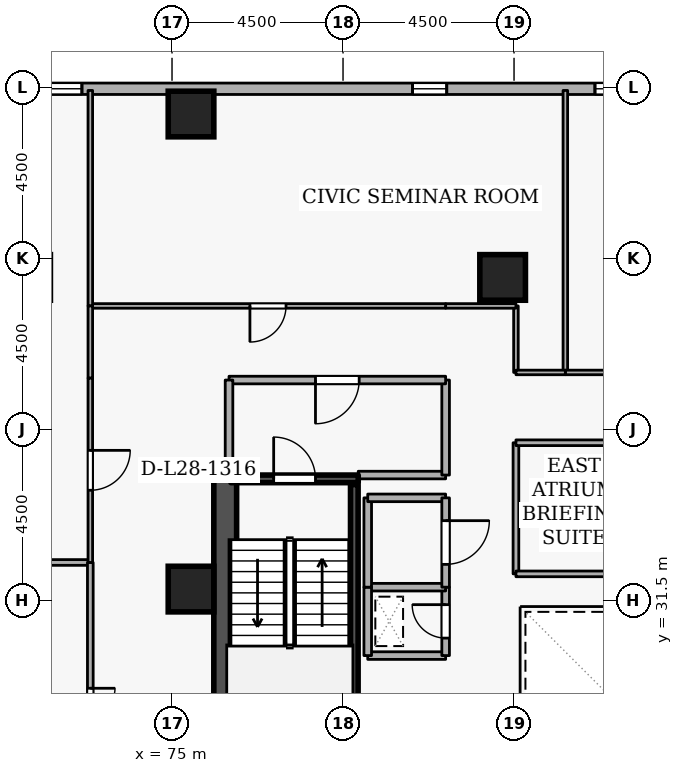
"""IFC4 building model, lengths in metres.
Left out: names, types, materials, properties, quantities, classifications, styles, units other than length and angle.
Written with IfcOpenShell. Run it as: python <this file> out.ifc"""

import sys

from ifc_helpers import new_model, si_unit, direction, frame, frame_2d, origin, origin_2d, place, context, subcontext, project, spatial, rectangle, extrude, element, fill, save


model = new_model("IFC4")
c1 = context("Model", 3, precision=1e-05, world=origin(), true_north=direction((0.0, 1.0)))
c2 = subcontext(c1, "Body", "Model", "MODEL_VIEW")
j1 = project(units=[si_unit("LENGTHUNIT", "METRE"), si_unit("PLANEANGLEUNIT", "RADIAN")], contexts=[c1])
p1 = place(None, origin())
s1 = spatial("IfcSite", under=j1, at=p1, CompositionType="ELEMENT")
p2 = place(p1, origin())
s2 = spatial("IfcBuilding", under=s1, at=p2, CompositionType="ELEMENT")
p3 = place(p2, frame((0.0, 0.0, 108.9)))
s3 = spatial("IfcBuildingStorey", under=s2, at=p3, CompositionType="ELEMENT", Elevation=108.9)
p4 = place(p3, frame((76.4, 19.2, 0.0), z_axis=(0.0, 0.0, 1.0), x_axis=(0.0, 1.0, 0.0)))
e1 = element("IfcWall", 1, at=p4, inside=s3, PredefinedType="SHEAR", context=c2, shape_type="SweptSolid", body=[
    extrude(rectangle(XDim=15.6, YDim=0.6, at=frame_2d((7.8, 0.0))), origin(), (0.0, 0.0, 1.0), 3.6),
])
for number, where, z_axis, x_axis in (
    (2, (75.5, 44.3, 0.0), (0.0, 0.0, 1.0), (1.0, 0.0, 0.0)),
    (3, (83.7, 40.0, 0.0), (0.0, 0.0, 1.0), (1.0, 0.0, 0.0)),
    (4, (75.5, 31.8, 0.0), (0.0, 0.0, 1.0), (1.0, 0.0, 0.0)),
):
    element("IfcColumn", number, at=place(p3, frame(where, z_axis=z_axis, x_axis=x_axis)), inside=s3, PredefinedType="COLUMN", context=c2, shape_type="SweptSolid", body=[
        extrude(rectangle(XDim=1.2, YDim=1.2, at=origin_2d()), origin(), (0.0, 0.0, 1.0), 3.6),
    ])
p5 = place(p3, frame((103.229, 44.963, 0.0), z_axis=(0.0, 0.0, 1.0), x_axis=(-0.999999998537, 5.4088042e-05, 0.0)))
e5 = element("IfcWall", 5, at=p5, inside=s3, PredefinedType="STANDARD", context=c2, shape_type="SweptSolid", body=[
    extrude(rectangle(XDim=36.11, YDim=0.3, at=frame_2d((18.055, 0.0))), origin(), (0.0, 0.0, 1.0), 2.7),
])
p6 = place(p5, frame((6.6, 0.0, 0.72)))
e6 = element("IfcOpeningElement", 6, at=p6, cuts=e5, PredefinedType="OPENING", context=c2, shape_type="SweptSolid", body=[
    extrude(rectangle(XDim=0.9, YDim=1.75, at=frame_2d((0.45, 0.875))), frame((0.0, 0.16, 0.0), z_axis=(0.0, -1.0, 0.0), x_axis=(1.0, 0.0, 0.0)), (0.0, 0.0, 1.0), 0.32),
])
p7 = place(p5, frame((11.4, 0.0, 0.72)))
e7 = element("IfcOpeningElement", 7, at=p7, cuts=e5, PredefinedType="OPENING", context=c2, shape_type="SweptSolid", body=[
    extrude(rectangle(XDim=0.9, YDim=1.75, at=frame_2d((0.45, 0.875))), frame((0.0, 0.16, 0.0), z_axis=(0.0, -1.0, 0.0), x_axis=(1.0, 0.0, 0.0)), (0.0, 0.0, 1.0), 0.32),
])
p8 = place(p5, frame((16.2, 0.0, 0.72)))
e8 = element("IfcOpeningElement", 8, at=p8, cuts=e5, PredefinedType="OPENING", context=c2, shape_type="SweptSolid", body=[
    extrude(rectangle(XDim=0.9, YDim=1.75, at=frame_2d((0.45, 0.875))), frame((0.0, 0.16, 0.0), z_axis=(0.0, -1.0, 0.0), x_axis=(1.0, 0.0, 0.0)), (0.0, 0.0, 1.0), 0.32),
])
p9 = place(p5, frame((21.0, 0.0, 0.72)))
e9 = element("IfcOpeningElement", 9, at=p9, cuts=e5, PredefinedType="OPENING", context=c2, shape_type="SweptSolid", body=[
    extrude(rectangle(XDim=0.9, YDim=1.75, at=frame_2d((0.45, 0.875))), frame((0.0, 0.16, 0.0), z_axis=(0.0, -1.0, 0.0), x_axis=(1.0, 0.0, 0.0)), (0.0, 0.0, 1.0), 0.32),
])
p10 = place(p5, frame((30.6, 0.0, 0.72)))
e10 = element("IfcOpeningElement", 10, at=p10, cuts=e5, PredefinedType="OPENING", context=c2, shape_type="SweptSolid", body=[
    extrude(rectangle(XDim=0.9, YDim=1.75, at=frame_2d((0.45, 0.875))), frame((0.0, 0.16, 0.0), z_axis=(0.0, -1.0, 0.0), x_axis=(1.0, 0.0, 0.0)), (0.0, 0.0, 1.0), 0.32),
])
p11 = place(p3, frame((76.55, 34.7, 0.0), z_axis=(0.0, 0.0, 1.0), x_axis=(1.0, 0.0, 0.0)))
e11 = element("IfcWall", 11, at=p11, inside=s3, PredefinedType="SHEAR", context=c2, shape_type="SweptSolid", body=[
    extrude(rectangle(XDim=3.35, YDim=0.2, at=frame_2d((1.675, 0.0))), origin(), (0.0, 0.0, 1.0), 3.6),
])
p12 = place(p11, frame((1.125, 0.0, 0.0)))
e12 = element("IfcOpeningElement", 12, at=p12, cuts=e11, PredefinedType="OPENING", context=c2, shape_type="SweptSolid", body=[
    extrude(rectangle(XDim=1.1, YDim=2.1, at=frame_2d((0.55, 1.05))), frame((0.0, 0.11, 0.0), z_axis=(0.0, -1.0, 0.0), x_axis=(1.0, 0.0, 0.0)), (0.0, 0.0, 1.0), 0.22),
])
p13 = place(p3, frame((79.797, 27.45, 0.0), z_axis=(0.0, 0.0, 1.0), x_axis=(0.0, 1.0, 0.0)))
e13 = element("IfcWall", 13, at=p13, inside=s3, PredefinedType="SHEAR", context=c2, shape_type="SweptSolid", body=[
    extrude(rectangle(XDim=7.1, YDim=0.2, at=frame_2d((3.55, 0.0))), origin(), (0.0, 0.0, 1.0), 3.6),
])
p14 = place(p3, frame((79.9, 34.8, 0.0), z_axis=(0.0, 0.0, 1.0), x_axis=(1.0, 0.0, 0.0)))
e14 = element("IfcWall", 14, at=p14, inside=s3, PredefinedType="STANDARD", context=c2, shape_type="SweptSolid", body=[
    extrude(rectangle(XDim=2.3, YDim=0.2, at=frame_2d((1.15, 0.0))), origin(), (0.0, 0.0, 1.0), 2.545),
])
p15 = place(p3, frame((82.2, 34.8, 0.0), z_axis=(0.0, 0.0, 1.0), x_axis=(0.0, 1.0, 0.0)))
e15 = element("IfcWall", 15, at=p15, inside=s3, PredefinedType="STANDARD", context=c2, shape_type="SweptSolid", body=[
    extrude(rectangle(XDim=2.5, YDim=0.2, at=frame_2d((1.25, 0.0))), origin(), (0.0, 0.0, 1.0), 3.34),
])
p16 = place(p3, frame((82.2, 37.3, 0.0), z_axis=(0.0, 0.0, 1.0), x_axis=(-1.0, 0.0, 0.0)))
e16 = element("IfcWall", 16, at=p16, inside=s3, PredefinedType="STANDARD", context=c2, shape_type="SweptSolid", body=[
    extrude(rectangle(XDim=5.7, YDim=0.2, at=frame_2d((2.85, 0.0))), origin(), (0.0, 0.0, 1.0), 3.34),
])
p17 = place(p16, frame((2.275, 0.0, 0.0)))
e17 = element("IfcOpeningElement", 17, at=p17, cuts=e16, PredefinedType="OPENING", context=c2, shape_type="SweptSolid", body=[
    extrude(rectangle(XDim=1.15, YDim=2.1, at=frame_2d((0.575, 1.05))), frame((0.0, 0.11, 0.0), z_axis=(0.0, -1.0, 0.0), x_axis=(1.0, 0.0, 0.0)), (0.0, 0.0, 1.0), 0.22),
])
p18 = place(p3, frame((76.5, 37.3, 0.0), z_axis=(0.0, 0.0, 1.0), x_axis=(0.0, -1.0, 0.0)))
e18 = element("IfcWall", 18, at=p18, inside=s3, PredefinedType="STANDARD", context=c2, shape_type="SweptSolid", body=[
    extrude(rectangle(XDim=2.5, YDim=0.2, at=frame_2d((1.25, 0.0))), origin(), (0.0, 0.0, 1.0), 3.34),
])
p19 = place(p3, frame((80.15, 30.05, 0.0), z_axis=(0.0, 0.0, 1.0), x_axis=(1.0, 0.0, 0.0)))
e19 = element("IfcWall", 19, at=p19, inside=s3, PredefinedType="STANDARD", context=c2, shape_type="SweptSolid", body=[
    extrude(rectangle(XDim=2.05, YDim=0.2, at=frame_2d((1.025, 0.0))), origin(), (0.0, 0.0, 1.0), 3.34),
])
p20 = place(p3, frame((82.2, 30.05, 0.0), z_axis=(0.0, 0.0, 1.0), x_axis=(0.0, 1.0, 0.0)))
e20 = element("IfcWall", 20, at=p20, inside=s3, PredefinedType="STANDARD", context=c2, shape_type="SweptSolid", body=[
    extrude(rectangle(XDim=1.8, YDim=0.2, at=frame_2d((0.9, 0.0))), origin(), (0.0, 0.0, 1.0), 3.34),
])
p21 = place(p20, frame((0.46, 0.0, 0.0)))
e21 = element("IfcOpeningElement", 21, at=p21, cuts=e20, PredefinedType="OPENING", context=c2, shape_type="SweptSolid", body=[
    extrude(rectangle(XDim=0.88, YDim=2.04, at=frame_2d((0.44, 1.02))), frame((0.0, 0.11, 0.0), z_axis=(0.0, -1.0, 0.0), x_axis=(1.0, 0.0, 0.0)), (0.0, 0.0, 1.0), 0.22),
])
p22 = place(p3, frame((82.2, 31.85, 0.0), z_axis=(0.0, 0.0, 1.0), x_axis=(-1.0, 0.0, 0.0)))
e22 = element("IfcWall", 22, at=p22, inside=s3, PredefinedType="STANDARD", context=c2, shape_type="SweptSolid", body=[
    extrude(rectangle(XDim=2.05, YDim=0.2, at=frame_2d((1.025, 0.0))), origin(), (0.0, 0.0, 1.0), 3.34),
])
p23 = place(p3, frame((80.15, 31.85, 0.0), z_axis=(0.0, 0.0, 1.0), x_axis=(0.0, -1.0, 0.0)))
e23 = element("IfcWall", 23, at=p23, inside=s3, PredefinedType="STANDARD", context=c2, shape_type="SweptSolid", body=[
    extrude(rectangle(XDim=1.8, YDim=0.2, at=frame_2d((0.9, 0.0))), origin(), (0.0, 0.0, 1.0), 3.34),
])
p24 = place(p3, frame((80.15, 31.85, 0.0), z_axis=(0.0, 0.0, 1.0), x_axis=(0.0, 1.0, 0.0)))
e24 = element("IfcWall", 24, at=p24, inside=s3, PredefinedType="STANDARD", context=c2, shape_type="SweptSolid", body=[
    extrude(rectangle(XDim=2.35, YDim=0.2, at=frame_2d((1.175, 0.0))), origin(), (0.0, 0.0, 1.0), 3.34),
])
p25 = place(p3, frame((80.15, 34.2, 0.0), z_axis=(0.0, 0.0, 1.0), x_axis=(1.0, 0.0, 0.0)))
e25 = element("IfcWall", 25, at=p25, inside=s3, PredefinedType="STANDARD", context=c2, shape_type="SweptSolid", body=[
    extrude(rectangle(XDim=2.05, YDim=0.2, at=frame_2d((1.025, 0.0))), origin(), (0.0, 0.0, 1.0), 2.545),
])
p26 = place(p3, frame((82.2, 34.2, 0.0), z_axis=(0.0, 0.0, 1.0), x_axis=(0.0, -1.0, 0.0)))
e26 = element("IfcWall", 26, at=p26, inside=s3, PredefinedType="STANDARD", context=c2, shape_type="SweptSolid", body=[
    extrude(rectangle(XDim=2.35, YDim=0.2, at=frame_2d((1.175, 0.0))), origin(), (0.0, 0.0, 1.0), 3.34),
])
p27 = place(p26, frame((0.6, 0.0, 0.0)))
e27 = element("IfcOpeningElement", 27, at=p27, cuts=e26, PredefinedType="OPENING", context=c2, shape_type="SweptSolid", body=[
    extrude(rectangle(XDim=1.15, YDim=2.1, at=frame_2d((0.575, 1.05))), frame((0.0, 0.11, 0.0), z_axis=(0.0, -1.0, 0.0), x_axis=(1.0, 0.0, 0.0)), (0.0, 0.0, 1.0), 0.22),
])
p28 = place(p3, frame((85.35, 37.5, 0.0), z_axis=(0.0, 0.0, 1.0), x_axis=(0.0, 1.0, 0.0)))
e28 = element("IfcWall", 28, at=p28, inside=s3, PredefinedType="PARTITIONING", context=c2, shape_type="SweptSolid", body=[
    extrude(rectangle(XDim=7.42, YDim=0.12, at=frame_2d((3.71, 0.0))), origin(), (0.0, 0.0, 1.0), 3.34),
])
p29 = place(p3, frame((88.5, 37.5, 0.0), z_axis=(0.0, 0.0, 1.0), x_axis=(-1.0, 0.0, 0.0)))
e29 = element("IfcWall", 29, at=p29, inside=s3, PredefinedType="PARTITIONING", context=c2, shape_type="SweptSolid", body=[
    extrude(rectangle(XDim=3.15, YDim=0.12, at=frame_2d((1.575, 0.0))), origin(), (0.0, 0.0, 1.0), 3.34),
])
p30 = place(p29, frame((1.1, 0.0, 0.0)))
e30 = element("IfcOpeningElement", 30, at=p30, cuts=e29, PredefinedType="OPENING", context=c2, shape_type="SweptSolid", body=[
    extrude(rectangle(XDim=0.95, YDim=2.1, at=frame_2d((0.475, 1.05))), frame((0.0, 0.07, 0.0), z_axis=(0.0, -1.0, 0.0), x_axis=(1.0, 0.0, 0.0)), (0.0, 0.0, 1.0), 0.14),
])
p31 = place(p3, frame((84.05, 37.5, 0.0), z_axis=(0.0, 0.0, 1.0), x_axis=(0.0, 1.0, 0.0)))
e31 = element("IfcWall", 31, at=p31, inside=s3, PredefinedType="PARTITIONING", context=c2, shape_type="SweptSolid", body=[
    extrude(rectangle(XDim=1.75, YDim=0.12, at=frame_2d((0.875, 0.0))), origin(), (0.0, 0.0, 1.0), 3.34),
])
p32 = place(p3, frame((84.05, 39.25, 0.0), z_axis=(0.0, 0.0, 1.0), x_axis=(-1.0, 0.0, 0.0)))
e32 = element("IfcWall", 32, at=p32, inside=s3, PredefinedType="PARTITIONING", context=c2, shape_type="SweptSolid", body=[
    extrude(rectangle(XDim=1.85, YDim=0.12, at=frame_2d((0.925, 0.0))), origin(), (0.0, 0.0, 1.0), 3.34),
])
p33 = place(p3, frame((82.2, 39.25, 0.0), z_axis=(0.0, 0.0, 1.0), x_axis=(-1.0, 0.0, 0.0)))
e33 = element("IfcWall", 33, at=p33, inside=s3, PredefinedType="PARTITIONING", context=c2, shape_type="SweptSolid", body=[
    extrude(rectangle(XDim=9.35, YDim=0.12, at=frame_2d((4.675, 0.0))), origin(), (0.0, 0.0, 1.0), 3.34),
])
p34 = place(p33, frame((4.2, 0.0, 0.0)))
e34 = element("IfcOpeningElement", 34, at=p34, cuts=e33, PredefinedType="OPENING", context=c2, shape_type="SweptSolid", body=[
    extrude(rectangle(XDim=0.95, YDim=2.1, at=frame_2d((0.475, 1.05))), frame((0.0, 0.07, 0.0), z_axis=(0.0, -1.0, 0.0), x_axis=(1.0, 0.0, 0.0)), (0.0, 0.0, 1.0), 0.14),
])
p35 = place(p3, frame((72.85, 39.25, 0.0), z_axis=(0.0, 0.0, 1.0), x_axis=(0.0, 1.0, 0.0)))
e35 = element("IfcWall", 35, at=p35, inside=s3, PredefinedType="PARTITIONING", context=c2, shape_type="SweptSolid", body=[
    extrude(rectangle(XDim=5.67, YDim=0.12, at=frame_2d((2.835, 0.0))), origin(), (0.0, 0.0, 1.0), 3.34),
])
p36 = place(p3, frame((85.35, 37.5, 0.0), z_axis=(0.0, 0.0, 1.0), x_axis=(-1.0, 0.0, 0.0)))
e36 = element("IfcWall", 36, at=p36, inside=s3, PredefinedType="PARTITIONING", context=c2, shape_type="SweptSolid", body=[
    extrude(rectangle(XDim=1.3, YDim=0.12, at=frame_2d((0.65, 0.0))), origin(), (0.0, 0.0, 1.0), 3.34),
])
p37 = place(p3, frame((84.05, 32.2, 0.0), z_axis=(0.0, 0.0, 1.0), x_axis=(0.0, 1.0, 0.0)))
e37 = element("IfcWall", 37, at=p37, inside=s3, PredefinedType="PARTITIONING", context=c2, shape_type="SweptSolid", body=[
    extrude(rectangle(XDim=3.45, YDim=0.15, at=frame_2d((1.725, 0.0))), origin(), (0.0, 0.0, 1.0), 3.34),
])
p38 = place(p3, frame((84.05, 35.65, 0.0), z_axis=(0.0, 0.0, 1.0), x_axis=(1.0, 0.0, 0.0)))
e38 = element("IfcWall", 38, at=p38, inside=s3, PredefinedType="PARTITIONING", context=c2, shape_type="SweptSolid", body=[
    extrude(rectangle(XDim=8.9, YDim=0.15, at=frame_2d((4.45, 0.0))), origin(), (0.0, 0.0, 1.0), 3.34),
])
p39 = place(p38, frame((3.8, 0.0, 0.0)))
e39 = element("IfcOpeningElement", 39, at=p39, cuts=e38, PredefinedType="OPENING", context=c2, shape_type="SweptSolid", body=[
    extrude(rectangle(XDim=1.3, YDim=2.12, at=frame_2d((0.65, 1.06))), frame((0.0, 0.085, 0.0), z_axis=(0.0, -1.0, 0.0), x_axis=(1.0, 0.0, 0.0)), (0.0, 0.0, 1.0), 0.17),
])
p40 = place(p3, frame((92.95, 32.2, 0.0), z_axis=(0.0, 0.0, 1.0), x_axis=(-1.0, 0.0, 0.0)))
e40 = element("IfcWall", 40, at=p40, inside=s3, PredefinedType="PARTITIONING", context=c2, shape_type="SweptSolid", body=[
    extrude(rectangle(XDim=8.9, YDim=0.15, at=frame_2d((4.45, 0.0))), origin(), (0.0, 0.0, 1.0), 3.34),
])
p41 = place(p3, frame((64.58, 32.5, 0.0), z_axis=(0.0, 0.0, 1.0), x_axis=(1.0, 0.0, 0.0)))
e41 = element("IfcWall", 41, at=p41, inside=s3, PredefinedType="PARTITIONING", context=c2, shape_type="SweptSolid", body=[
    extrude(rectangle(XDim=8.27, YDim=0.15, at=frame_2d((4.135, 0.0))), origin(), (0.0, 0.0, 1.0), 3.34),
])
p42 = place(p3, frame((72.85, 32.5, 0.0), z_axis=(0.0, 0.0, 1.0), x_axis=(0.0, -1.0, 0.0)))
e42 = element("IfcWall", 42, at=p42, inside=s3, PredefinedType="PARTITIONING", context=c2, shape_type="SweptSolid", body=[
    extrude(rectangle(XDim=11.0, YDim=0.15, at=frame_2d((5.5, 0.0))), origin(), (0.0, 0.0, 1.0), 3.34),
])
p43 = place(p42, frame((3.31, 0.0, 0.0)))
e43 = element("IfcOpeningElement", 43, at=p43, cuts=e42, PredefinedType="OPENING", context=c2, shape_type="SweptSolid", body=[
    extrude(rectangle(XDim=1.3, YDim=2.12, at=frame_2d((0.65, 1.06))), frame((0.0, 0.085, 0.0), z_axis=(0.0, -1.0, 0.0), x_axis=(1.0, 0.0, 0.0)), (0.0, 0.0, 1.0), 0.17),
])
p44 = place(p3, frame((72.85, 39.25, 0.0), z_axis=(0.0, 0.0, 1.0), x_axis=(0.0, -1.0, 0.0)))
e44 = element("IfcWall", 44, at=p44, inside=s3, PredefinedType="PARTITIONING", context=c2, shape_type="SweptSolid", body=[
    extrude(rectangle(XDim=1.9, YDim=0.12, at=frame_2d((0.95, 0.0))), origin(), (0.0, 0.0, 1.0), 3.34),
])
p45 = place(p3, frame((72.85, 37.35, 0.0), z_axis=(0.0, 0.0, 1.0), x_axis=(0.0, -1.0, 0.0)))
e45 = element("IfcWall", 45, at=p45, inside=s3, PredefinedType="PARTITIONING", context=c2, shape_type="SweptSolid", body=[
    extrude(rectangle(XDim=4.85, YDim=0.12, at=frame_2d((2.425, 0.0))), origin(), (0.0, 0.0, 1.0), 2.895),
])
p46 = place(p45, frame((1.9, 0.0, 0.0)))
e46 = element("IfcOpeningElement", 46, at=p46, cuts=e45, PredefinedType="OPENING", context=c2, shape_type="SweptSolid", body=[
    extrude(rectangle(XDim=1.05, YDim=2.1, at=frame_2d((0.525, 1.05))), frame((0.0, 0.07, 0.0), z_axis=(0.0, -1.0, 0.0), x_axis=(1.0, 0.0, 0.0)), (0.0, 0.0, 1.0), 0.14),
])
p47 = place(p8, origin())
e47 = element("IfcWindow", 47, at=p47, inside=s3, PartitioningType="SINGLE_PANEL", PredefinedType="WINDOW", context=c2, shape_type="SweptSolid", body=[
    extrude(rectangle(XDim=0.9, YDim=1.75, at=frame_2d((0.45, 0.875))), frame((0.0, 0.03, 0.0), z_axis=(0.0, -1.0, 0.0), x_axis=(1.0, 0.0, 0.0)), (0.0, 0.0, 1.0), 0.06),
])
fill(e8, e47)
p48 = place(p9, origin())
e48 = element("IfcWindow", 48, at=p48, inside=s3, PartitioningType="SINGLE_PANEL", PredefinedType="WINDOW", context=c2, shape_type="SweptSolid", body=[
    extrude(rectangle(XDim=0.9, YDim=1.75, at=frame_2d((0.45, 0.875))), frame((0.0, 0.03, 0.0), z_axis=(0.0, -1.0, 0.0), x_axis=(1.0, 0.0, 0.0)), (0.0, 0.0, 1.0), 0.06),
])
fill(e9, e48)
p49 = place(p10, origin())
e49 = element("IfcWindow", 49, at=p49, inside=s3, PartitioningType="SINGLE_PANEL", PredefinedType="WINDOW", context=c2, shape_type="SweptSolid", body=[
    extrude(rectangle(XDim=0.9, YDim=1.75, at=frame_2d((0.45, 0.875))), frame((0.0, 0.03, 0.0), z_axis=(0.0, -1.0, 0.0), x_axis=(1.0, 0.0, 0.0)), (0.0, 0.0, 1.0), 0.06),
])
fill(e10, e49)
p50 = place(p12, origin())
e50 = element("IfcDoor", 50, at=p50, inside=s3, OperationType="SINGLE_SWING_LEFT", PredefinedType="DOOR", context=c2, shape_type="SweptSolid", body=[
    extrude(rectangle(XDim=1.1, YDim=2.1, at=frame_2d((0.55, 1.05))), frame((0.0, 0.025, 0.0), z_axis=(0.0, -1.0, 0.0), x_axis=(1.0, 0.0, 0.0)), (0.0, 0.0, 1.0), 0.05),
])
fill(e12, e50)
p51 = place(p17, origin())
e51 = element("IfcDoor", 51, at=p51, inside=s3, OperationType="SINGLE_SWING_RIGHT", PredefinedType="DOOR", context=c2, shape_type="SweptSolid", body=[
    extrude(rectangle(XDim=1.15, YDim=2.1, at=frame_2d((0.575, 1.05))), frame((0.0, 0.025, 0.0), z_axis=(0.0, -1.0, 0.0), x_axis=(1.0, 0.0, 0.0)), (0.0, 0.0, 1.0), 0.05),
])
fill(e17, e51)
p52 = place(p21, origin())
e52 = element("IfcDoor", 52, at=p52, inside=s3, OperationType="SINGLE_SWING_RIGHT", PredefinedType="DOOR", context=c2, shape_type="SweptSolid", body=[
    extrude(rectangle(XDim=0.88, YDim=2.04, at=frame_2d((0.44, 1.02))), frame((0.0, 0.025, 0.0), z_axis=(0.0, -1.0, 0.0), x_axis=(1.0, 0.0, 0.0)), (0.0, 0.0, 1.0), 0.05),
])
fill(e21, e52)
p53 = place(p27, origin())
e53 = element("IfcDoor", 53, at=p53, inside=s3, OperationType="SINGLE_SWING_LEFT", PredefinedType="DOOR", context=c2, shape_type="SweptSolid", body=[
    extrude(rectangle(XDim=1.15, YDim=2.1, at=frame_2d((0.575, 1.05))), frame((0.0, 0.025, 0.0), z_axis=(0.0, -1.0, 0.0), x_axis=(1.0, 0.0, 0.0)), (0.0, 0.0, 1.0), 0.05),
])
fill(e27, e53)
p54 = place(p34, origin())
e54 = element("IfcDoor", 54, at=p54, inside=s3, OperationType="SINGLE_SWING_RIGHT", PredefinedType="DOOR", context=c2, shape_type="SweptSolid", body=[
    extrude(rectangle(XDim=0.95, YDim=2.1, at=frame_2d((0.475, 1.05))), frame((0.0, 0.025, 0.0), z_axis=(0.0, -1.0, 0.0), x_axis=(1.0, 0.0, 0.0)), (0.0, 0.0, 1.0), 0.05),
])
fill(e34, e54)
p55 = place(p43, origin())
e55 = element("IfcDoor", 55, at=p55, inside=s3, OperationType="DOUBLE_DOOR_SINGLE_SWING", PredefinedType="DOOR", context=c2, shape_type="SweptSolid", body=[
    extrude(rectangle(XDim=1.3, YDim=2.12, at=frame_2d((0.65, 1.06))), frame((0.0, 0.025, 0.0), z_axis=(0.0, -1.0, 0.0), x_axis=(1.0, 0.0, 0.0)), (0.0, 0.0, 1.0), 0.05),
])
fill(e43, e55)
p56 = place(p46, origin())
e56 = element("IfcDoor", 56, at=p56, inside=s3, OperationType="SINGLE_SWING_LEFT", PredefinedType="DOOR", context=c2, shape_type="SweptSolid", body=[
    extrude(rectangle(XDim=1.05, YDim=2.1, at=frame_2d((0.525, 1.05))), frame((0.0, 0.025, 0.0), z_axis=(0.0, -1.0, 0.0), x_axis=(1.0, 0.0, 0.0)), (0.0, 0.0, 1.0), 0.05),
])
fill(e46, e56)
save(model, sys.argv[1])
